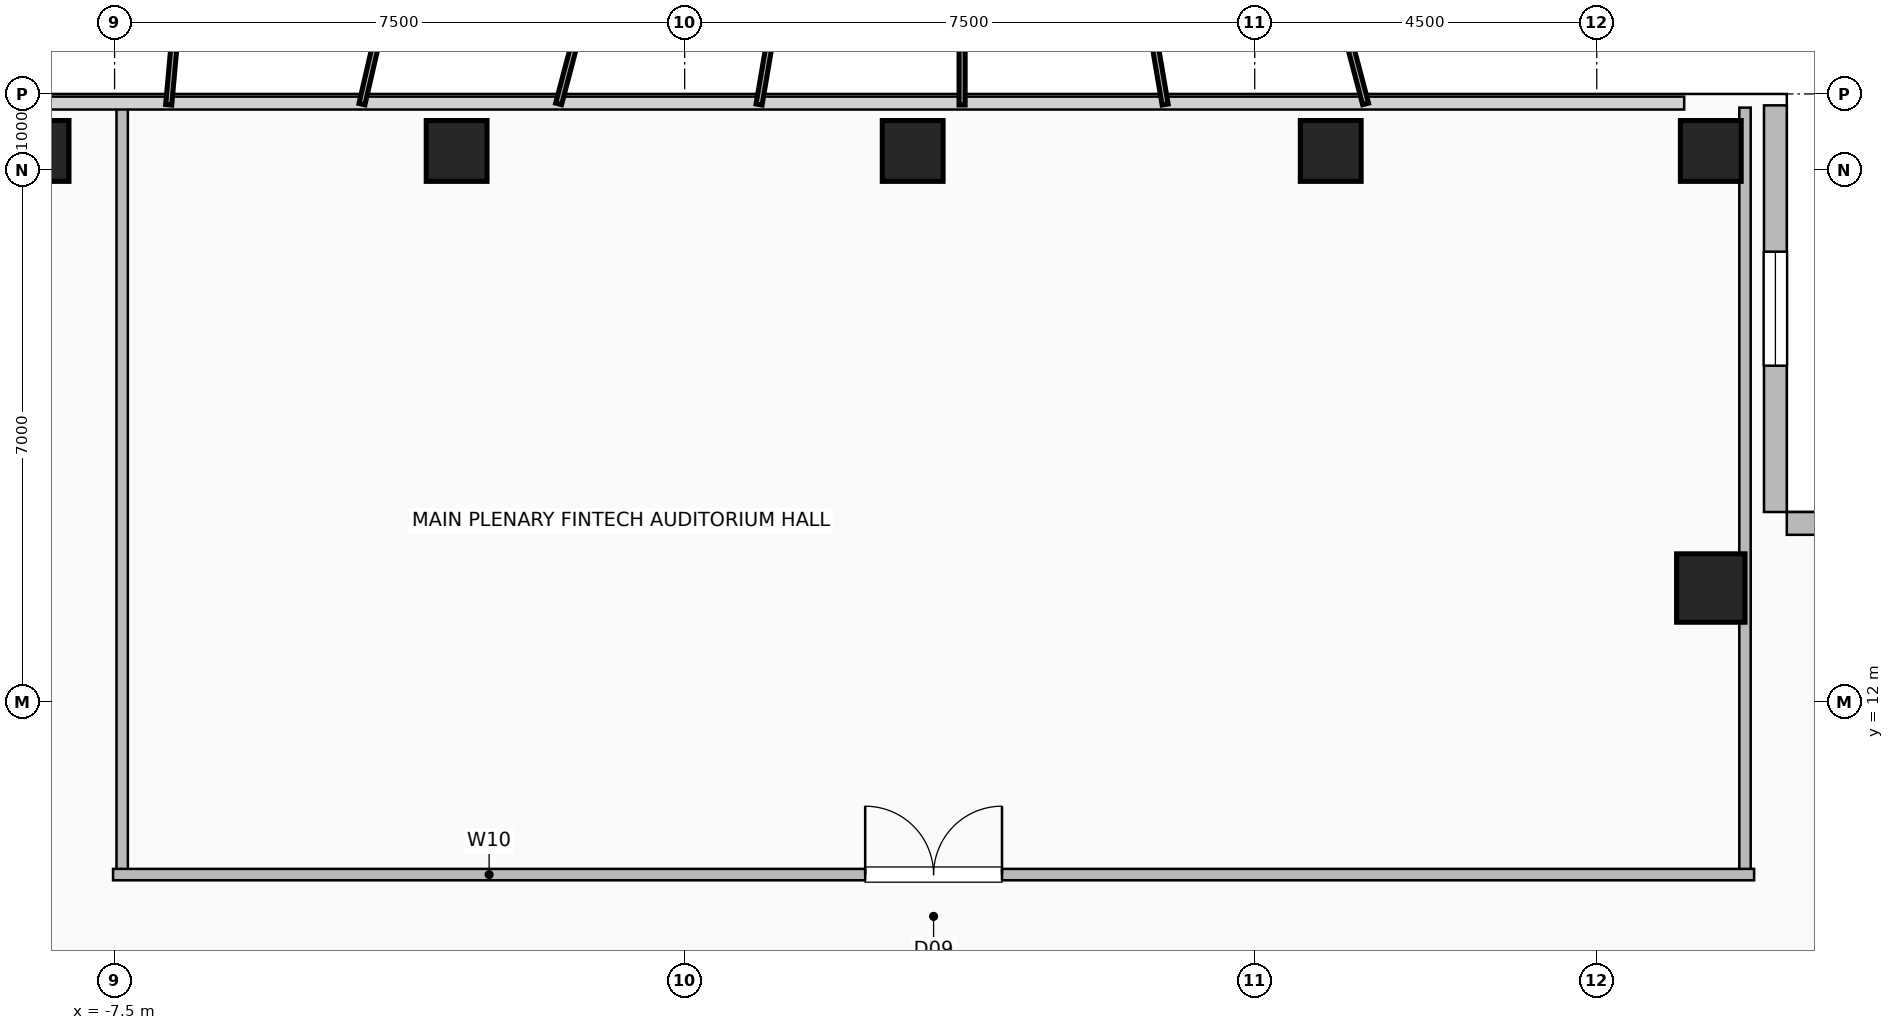
"""IFC4 building model, lengths in metres.
Left out: names, types, materials, properties, quantities, classifications, styles, units other than length and angle.
Written with IfcOpenShell. Run it as: python <this file> out.ifc"""

import sys

from ifc_helpers import new_model, si_unit, direction, frame, frame_2d, origin, origin_2d, place, context, subcontext, project, spatial, rectangle, hollow_rectangle, extrude, element, fill, save


model = new_model("IFC4")
c1 = context("Model", 3, precision=1e-05, world=origin(), true_north=direction((0.0, 1.0)))
c2 = subcontext(c1, "Body", "Model", "MODEL_VIEW")
j1 = project(units=[si_unit("LENGTHUNIT", "METRE"), si_unit("PLANEANGLEUNIT", "RADIAN")], contexts=[c1])
p1 = place(None, origin())
s1 = spatial("IfcSite", under=j1, at=p1, CompositionType="ELEMENT")
p2 = place(p1, origin())
s2 = spatial("IfcBuilding", under=s1, at=p2, CompositionType="ELEMENT")
p3 = place(p2, frame((0.0, 0.0, 216.6)))
s3 = spatial("IfcBuildingStorey", under=s2, at=p3, CompositionType="ELEMENT", Elevation=216.6)
for number, where, z_axis, x_axis in (
    (1, (-8.5, 19.25, 0.0), (0.0, 0.0, 1.0), (1.0, 0.0, 0.0)),
    (2, (-3.0, 19.25, 0.0), (0.0, 0.0, 1.0), (1.0, 0.0, 0.0)),
    (3, (3.0, 19.25, 0.0), (0.0, 0.0, 1.0), (1.0, 0.0, 0.0)),
    (4, (8.5, 19.25, 0.0), (0.0, 0.0, 1.0), (1.0, 0.0, 0.0)),
    (5, (13.5, 19.25, 0.0), (0.0, 0.0, 1.0), (1.0, 0.0, 0.0)),
):
    element("IfcColumn", number, at=place(p3, frame(where, z_axis=z_axis, x_axis=x_axis)), inside=s3, PredefinedType="COLUMN", context=c2, shape_type="SweptSolid", body=[
        extrude(hollow_rectangle(XDim=0.8, YDim=0.8, WallThickness=0.04, at=origin_2d()), origin(), (0.0, 0.0, 1.0), 3.6),
    ])
p4 = place(p3, frame((13.5, 13.5, 0.0), z_axis=(0.0, 0.0, 1.0), x_axis=(1.0, 0.0, 0.0)))
e6 = element("IfcColumn", 6, at=p4, inside=s3, PredefinedType="COLUMN", context=c2, shape_type="SweptSolid", body=[
    extrude(hollow_rectangle(XDim=0.9, YDim=0.9, WallThickness=0.045, at=origin_2d()), origin(), (0.0, 0.0, 1.0), 3.6),
])
p5 = place(p3, frame((14.35, 19.85, 0.0), z_axis=(0.0, 0.0, 1.0), x_axis=(0.0, -1.0, 0.0)))
e7 = element("IfcWall", 7, at=p5, inside=s3, PredefinedType="SOLIDWALL", context=c2, shape_type="SweptSolid", body=[
    extrude(rectangle(XDim=5.35, YDim=0.3, at=frame_2d((2.675, 0.0))), origin(), (0.0, 0.0, 1.0), 3.36),
])
p6 = place(p5, frame((1.925, 0.0, 0.9)))
e8 = element("IfcOpeningElement", 8, at=p6, cuts=e7, PredefinedType="OPENING", context=c2, shape_type="SweptSolid", body=[
    extrude(rectangle(XDim=1.5, YDim=1.8, at=frame_2d((0.75, 0.9))), frame((0.0, 0.16, 0.0), z_axis=(0.0, -1.0, 0.0), x_axis=(1.0, 0.0, 0.0)), (0.0, 0.0, 1.0), 0.32),
])
p7 = place(p3, frame((19.85, 14.35, 0.0), z_axis=(0.0, 0.0, 1.0), x_axis=(-1.0, 0.0, 0.0)))
e9 = element("IfcWall", 9, at=p7, inside=s3, PredefinedType="SOLIDWALL", context=c2, shape_type="SweptSolid", body=[
    extrude(rectangle(XDim=5.35, YDim=0.3, at=frame_2d((2.675, 0.0))), origin(), (0.0, 0.0, 1.0), 3.36),
])
for number, where, z_axis, x_axis in (
    (10, (-7.4, 9.73, 0.0), (0.0, 0.0, 1.0), (0.0, 1.0, 0.0)),
    (11, (13.95, 9.73, 0.0), (0.0, 0.0, 1.0), (0.0, 1.0, 0.0)),
):
    element("IfcWall", number, at=place(p3, frame(where, z_axis=z_axis, x_axis=x_axis)), inside=s3, PredefinedType="PARTITIONING", context=c2, shape_type="SweptSolid", body=[
        extrude(rectangle(XDim=10.09, YDim=0.15, at=frame_2d((5.045, 0.0))), origin(), (0.0, 0.0, 1.0), 3.36),
    ])
p8 = place(p3, frame((-7.52, 9.73, 0.0), z_axis=(0.0, 0.0, 1.0), x_axis=(1.0, 0.0, 0.0)))
e12 = element("IfcWall", 12, at=p8, inside=s3, PredefinedType="PARTITIONING", context=c2, shape_type="SweptSolid", body=[
    extrude(rectangle(XDim=21.59, YDim=0.15, at=frame_2d((10.795, 0.0))), origin(), (0.0, 0.0, 1.0), 3.36),
])
p9 = place(p8, frame((9.895, 0.0, 0.0)))
e13 = element("IfcOpeningElement", 13, at=p9, cuts=e12, PredefinedType="OPENING", context=c2, shape_type="SweptSolid", body=[
    extrude(rectangle(XDim=1.8, YDim=2.08, at=frame_2d((0.9, 1.04))), frame((0.0, 0.085, 0.0), z_axis=(0.0, -1.0, 0.0), x_axis=(1.0, 0.0, 0.0)), (0.0, 0.0, 1.0), 0.17),
])
p10 = place(p6, origin())
e14 = element("IfcWindow", 14, at=p10, inside=s3, PartitioningType="SINGLE_PANEL", PredefinedType="WINDOW", context=c2, shape_type="SweptSolid", body=[
    extrude(rectangle(XDim=1.5, YDim=1.8, at=frame_2d((0.75, 0.9))), frame((0.0, 0.03, 0.0), z_axis=(0.0, -1.0, 0.0), x_axis=(1.0, 0.0, 0.0)), (0.0, 0.0, 1.0), 0.06),
])
fill(e8, e14)
p11 = place(p9, origin())
e15 = element("IfcDoor", 15, at=p11, inside=s3, OperationType="DOUBLE_DOOR_SINGLE_SWING", PredefinedType="DOOR", context=c2, shape_type="SweptSolid", body=[
    extrude(rectangle(XDim=1.8, YDim=2.08, at=frame_2d((0.9, 1.04))), frame((0.0, 0.025, 0.0), z_axis=(0.0, -1.0, 0.0), x_axis=(1.0, 0.0, 0.0)), (0.0, 0.0, 1.0), 0.05),
])
fill(e13, e15)
save(model, sys.argv[1])
